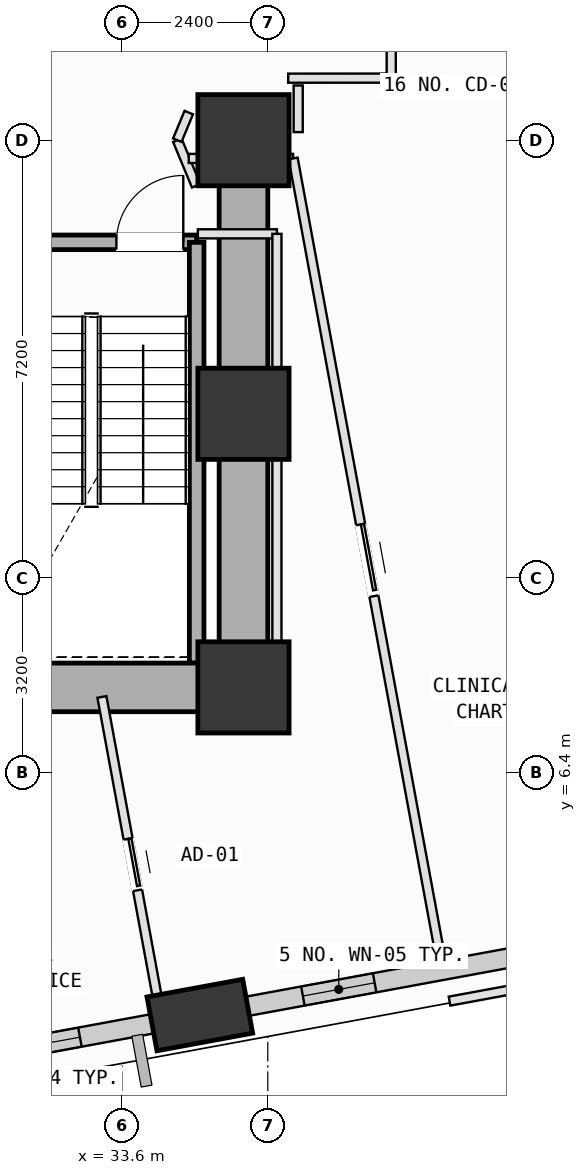
"""IFC4 building model, lengths in metres.
Left out: names, types, materials, properties, quantities, classifications, styles, units other than length and angle.
Written with IfcOpenShell. Run it as: python <this file> out.ifc"""

import sys

from ifc_helpers import new_model, si_unit, direction, frame, frame_2d, origin, origin_2d, place, context, subcontext, project, spatial, rectangle, extrude, element, fill, save


model = new_model("IFC4")
c1 = context("Model", 3, precision=1e-05, world=origin(), true_north=direction((0.0, 1.0)))
c2 = subcontext(c1, "Body", "Model", "MODEL_VIEW")
j1 = project(units=[si_unit("LENGTHUNIT", "METRE"), si_unit("PLANEANGLEUNIT", "RADIAN")], contexts=[c1])
p1 = place(None, origin())
s1 = spatial("IfcSite", under=j1, at=p1, CompositionType="ELEMENT")
p2 = place(p1, origin())
s2 = spatial("IfcBuilding", under=s1, at=p2, CompositionType="ELEMENT")
p3 = place(p2, frame((0.0, 0.0, 67.0)))
s3 = spatial("IfcBuildingStorey", under=s2, at=p3, CompositionType="ELEMENT", Elevation=67.0)
for number, where, z_axis, x_axis in (
    (1, (35.6, 7.8, 0.0), (0.0, 0.0, 1.0), (1.0, 0.0, 0.0)),
    (2, (35.6, 12.3, 0.0), (0.0, 0.0, 1.0), (1.0, 0.0, 0.0)),
    (3, (35.6, 16.8, 0.0), (0.0, 0.0, 1.0), (1.0, 0.0, 0.0)),
):
    element("IfcColumn", number, at=place(p3, frame(where, z_axis=z_axis, x_axis=x_axis)), inside=s3, PredefinedType="COLUMN", context=c2, shape_type="SweptSolid", body=[
        extrude(rectangle(XDim=1.5, YDim=1.5, at=origin_2d()), origin(), (0.0, 0.0, 1.0), 4.0),
    ])
p4 = place(p3, frame((34.882, 2.411, 0.002), z_axis=(0.092332756055, 0.006082526749, 0.995709628872), x_axis=(-0.244852017256, 0.969415188648, 0.016783374669)))
e4 = element("IfcColumn", 4, at=p4, inside=s3, PredefinedType="COLUMN", context=c2, shape_type="SweptSolid", body=[
    extrude(rectangle(XDim=1.6, YDim=0.9, at=origin_2d()), origin(), (0.0, 0.0, 1.0), 4.014),
])
p5 = place(p3, frame((34.466, 2.334, 0.0), z_axis=(0.0, 0.0, 1.0), x_axis=(-0.983412841191, -0.181381321478, 0.0)))
e5 = element("IfcWall", 5, at=p5, inside=s3, PredefinedType="SOLIDWALL", context=c2, shape_type="SweptSolid", body=[
    extrude(rectangle(XDim=5.99, YDim=0.32, at=frame_2d((2.995, 0.0))), origin(), (0.0, 0.0, 1.0), 3.165),
])
p6 = place(p5, frame((1.582, 0.0, 0.75)))
e6 = element("IfcOpeningElement", 6, at=p6, cuts=e5, PredefinedType="OPENING", context=c2, shape_type="SweptSolid", body=[
    extrude(rectangle(XDim=1.8, YDim=2.05, at=frame_2d((0.9, 1.025))), frame((0.0, 0.17, 0.0), z_axis=(0.0, -1.0, 0.0), x_axis=(1.0, 0.0, 0.0)), (0.0, 0.0, 1.0), 0.34),
])
p7 = place(p3, frame((41.547, 3.64, 0.0), z_axis=(0.0, 0.0, 1.0), x_axis=(-0.983417788938, -0.181354493742, 0.0)))
e7 = element("IfcWall", 7, at=p7, inside=s3, PredefinedType="SOLIDWALL", context=c2, shape_type="SweptSolid", body=[
    extrude(rectangle(XDim=5.985, YDim=0.32, at=frame_2d((2.993, 0.0))), origin(), (0.0, 0.0, 1.0), 3.165),
])
p8 = place(p7, frame((3.854, 0.0, 0.75)))
e8 = element("IfcOpeningElement", 8, at=p8, cuts=e7, PredefinedType="OPENING", context=c2, shape_type="SweptSolid", body=[
    extrude(rectangle(XDim=1.2, YDim=1.75, at=frame_2d((0.6, 0.875))), frame((0.0, 0.17, 0.0), z_axis=(0.0, -1.0, 0.0), x_axis=(1.0, 0.0, 0.0)), (0.0, 0.0, 1.0), 0.34),
])
p9 = place(p3, frame((31.37, 15.12, 0.0), z_axis=(0.0, 0.0, 1.0), x_axis=(1.0, 0.0, 0.0)))
e9 = element("IfcWall", 9, at=p9, inside=s3, PredefinedType="SOLIDWALL", context=c2, shape_type="SweptSolid", body=[
    extrude(rectangle(XDim=3.46, YDim=0.24, at=frame_2d((1.73, 0.0))), origin(), (0.0, 0.0, 1.0), 3.78),
])
p10 = place(p9, frame((2.14, 0.0, 0.0)))
e10 = element("IfcOpeningElement", 10, at=p10, cuts=e9, PredefinedType="OPENING", context=c2, shape_type="SweptSolid", body=[
    extrude(rectangle(XDim=1.1, YDim=2.15, at=frame_2d((0.55, 1.075))), frame((0.0, 0.13, 0.0), z_axis=(0.0, -1.0, 0.0), x_axis=(1.0, 0.0, 0.0)), (0.0, 0.0, 1.0), 0.26),
])
p11 = place(p3, frame((34.83, 15.12, 0.0), z_axis=(0.0, 0.0, 1.0), x_axis=(0.0, -1.0, 0.0)))
e11 = element("IfcWall", 11, at=p11, inside=s3, PredefinedType="SOLIDWALL", context=c2, shape_type="SweptSolid", body=[
    extrude(rectangle(XDim=6.92, YDim=0.24, at=frame_2d((3.46, 0.0))), origin(), (0.0, 0.0, 1.0), 3.78),
])
p12 = place(p3, frame((24.8, 7.8, 0.0), z_axis=(0.0, 0.0, 1.0), x_axis=(1.0, 0.0, 0.0)))
e12 = element("IfcWall", 12, at=p12, inside=s3, PredefinedType="SHEAR", context=c2, shape_type="SweptSolid", body=[
    extrude(rectangle(XDim=10.8, YDim=0.8, at=frame_2d((5.4, 0.0))), origin(), (0.0, 0.0, 1.0), 3.78),
])
p13 = place(p3, frame((35.6, 7.8, 0.0), z_axis=(0.0, 0.0, 1.0), x_axis=(0.0, 1.0, 0.0)))
e13 = element("IfcWall", 13, at=p13, inside=s3, PredefinedType="SHEAR", context=c2, shape_type="SweptSolid", body=[
    extrude(rectangle(XDim=9.0, YDim=0.8, at=frame_2d((4.5, 0.0))), origin(), (0.0, 0.0, 1.0), 3.78),
])
p14 = place(p3, frame((33.272, 7.643, 0.0), z_axis=(0.0, 0.0, 1.0), x_axis=(0.181243297431, -0.983438288423, 0.0)))
e14 = element("IfcWall", 14, at=p14, inside=s3, PredefinedType="PARTITIONING", context=c2, shape_type="SweptSolid", body=[
    extrude(rectangle(XDim=5.302, YDim=0.15, at=frame_2d((2.651, 0.0))), origin(), (0.0, 0.0, 1.0), 3.78),
])
p15 = place(p14, frame((2.373, 0.0, 0.0)))
e15 = element("IfcOpeningElement", 15, at=p15, cuts=e14, PredefinedType="OPENING", context=c2, shape_type="SweptSolid", body=[
    extrude(rectangle(XDim=0.86, YDim=2.06, at=frame_2d((0.43, 1.03))), frame((0.0, 0.085, 0.0), z_axis=(0.0, -1.0, 0.0), x_axis=(1.0, 0.0, 0.0)), (0.0, 0.0, 1.0), 0.17),
])
p16 = place(p3, frame((36.15, 15.26, 0.0), z_axis=(0.0, 0.0, 1.0), x_axis=(-1.0, 0.0, 0.0)))
e16 = element("IfcWall", 16, at=p16, inside=s3, PredefinedType="PARTITIONING", context=c2, shape_type="SweptSolid", body=[
    extrude(rectangle(XDim=1.3, YDim=0.15, at=frame_2d((0.65, 0.0))), origin(), (0.0, 0.0, 1.0), 3.78),
])
p17 = place(p3, frame((34.822, 16.05, 0.0), z_axis=(0.0, 0.0, 1.0), x_axis=(-0.382050639738, 0.924141389981, 0.0)))
e17 = element("IfcWall", 17, at=p17, inside=s3, PredefinedType="PARTITIONING", context=c2, shape_type="SweptSolid", body=[
    extrude(rectangle(XDim=0.812, YDim=0.15, at=frame_2d((0.406, 0.0))), origin(), (0.0, 0.0, 1.0), 3.78),
])
p18 = place(p3, frame((34.512, 16.8, 0.0), z_axis=(0.0, 0.0, 1.0), x_axis=(0.382673670509, 0.923883575944, 0.0)))
e18 = element("IfcWall", 18, at=p18, inside=s3, PredefinedType="PARTITIONING", context=c2, shape_type="SweptSolid", body=[
    extrude(rectangle(XDim=0.491, YDim=0.15, at=frame_2d((0.246, 0.0))), origin(), (0.0, 0.0, 1.0), 3.78),
])
p19 = place(p3, frame((34.7, 16.5, 0.0), z_axis=(0.0, 0.0, 1.0), x_axis=(1.0, 0.0, 0.0)))
e19 = element("IfcWall", 19, at=p19, inside=s3, PredefinedType="PARTITIONING", context=c2, shape_type="SweptSolid", body=[
    extrude(rectangle(XDim=1.717, YDim=0.15, at=frame_2d((0.858, 0.0))), origin(), (0.0, 0.0, 1.0), 2.865),
])
p20 = place(p3, frame((36.417, 16.5, 0.0), z_axis=(0.0, 0.0, 1.0), x_axis=(0.181371836751, -0.983414590513, 0.0)))
e20 = element("IfcWall", 20, at=p20, inside=s3, PredefinedType="PARTITIONING", context=c2, shape_type="SweptSolid", body=[
    extrude(rectangle(XDim=13.442, YDim=0.15, at=frame_2d((6.721, 0.0))), origin(), (0.0, 0.0, 1.0), 3.78),
])
p21 = place(p20, frame((6.121, 0.0, 0.0)))
e21 = element("IfcOpeningElement", 21, at=p21, cuts=e20, PredefinedType="OPENING", context=c2, shape_type="SweptSolid", body=[
    extrude(rectangle(XDim=1.2, YDim=2.15, at=frame_2d((0.6, 1.075))), frame((0.0, 0.085, 0.0), z_axis=(0.0, -1.0, 0.0), x_axis=(1.0, 0.0, 0.0)), (0.0, 0.0, 1.0), 0.17),
])
p22 = place(p3, frame((35.703, 2.329, 0.0), z_axis=(0.0, 0.0, 1.0), x_axis=(-0.983292662079, -0.182031702461, 0.0)))
e22 = element("IfcWall", 22, at=p22, inside=s3, PredefinedType="PARTITIONING", context=c2, shape_type="SweptSolid", body=[
    extrude(rectangle(XDim=1.215, YDim=0.15, at=frame_2d((0.607, 0.0))), origin(), (0.0, 0.0, 1.0), 3.165),
])
p23 = place(p3, frame((35.6, 7.5, 0.0), z_axis=(0.0, 0.0, 1.0), x_axis=(1.0, 0.0, 0.0)))
e23 = element("IfcWall", 23, at=p23, inside=s3, PredefinedType="PARTITIONING", context=c2, shape_type="SweptSolid", body=[
    extrude(rectangle(XDim=0.55, YDim=0.15, at=frame_2d((0.275, 0.0))), origin(), (0.0, 0.0, 1.0), 3.78),
])
p24 = place(p3, frame((36.15, 7.5, 0.0), z_axis=(0.0, 0.0, 1.0), x_axis=(0.0, 1.0, 0.0)))
e24 = element("IfcWall", 24, at=p24, inside=s3, PredefinedType="PARTITIONING", context=c2, shape_type="SweptSolid", body=[
    extrude(rectangle(XDim=7.76, YDim=0.15, at=frame_2d((3.88, 0.0))), origin(), (0.0, 0.0, 1.0), 3.78),
])
p25 = place(p3, frame((36.336, 17.82, 0.0), z_axis=(0.0, 0.0, 1.0), x_axis=(0.999999829655, 0.000583685878, 0.0)))
e25 = element("IfcWall", 25, at=p25, inside=s3, PredefinedType="PARTITIONING", context=c2, shape_type="SweptSolid", body=[
    extrude(rectangle(XDim=1.673, YDim=0.15, at=frame_2d((0.836, 0.0))), origin(), (0.0, 0.0, 1.0), 3.78),
])
p26 = place(p3, frame((38.03, 17.85, 0.0), z_axis=(0.0, 0.0, 1.0), x_axis=(0.0, 1.0, 0.0)))
e26 = element("IfcWall", 26, at=p26, inside=s3, PredefinedType="PARTITIONING", context=c2, shape_type="SweptSolid", body=[
    extrude(rectangle(XDim=0.7, YDim=0.15, at=frame_2d((0.35, 0.0))), origin(), (0.0, 0.0, 1.0), 3.78),
])
p27 = place(p3, frame((36.5, 16.933, 0.0), z_axis=(0.0, 0.0, 1.0), x_axis=(0.0, 1.0, 0.0)))
e27 = element("IfcWall", 27, at=p27, inside=s3, PredefinedType="PARTITIONING", context=c2, shape_type="SweptSolid", body=[
    extrude(rectangle(XDim=0.767, YDim=0.15, at=frame_2d((0.383, 0.0))), origin(), (0.0, 0.0, 1.0), 3.78),
])
p28 = place(p3, frame((45.076, 3.763, 0.0), z_axis=(0.0, 0.0, 1.0), x_axis=(-0.983402108303, -0.181439503377, 0.0)))
e28 = element("IfcWall", 28, at=p28, inside=s3, PredefinedType="PARTITIONING", context=c2, shape_type="SweptSolid", body=[
    extrude(rectangle(XDim=6.19, YDim=0.15, at=frame_2d((3.095, 0.0))), origin(), (0.0, 0.0, 1.0), 3.78),
])
p29 = place(p6, origin())
e29 = element("IfcWindow", 29, at=p29, inside=s3, PartitioningType="SINGLE_PANEL", PredefinedType="WINDOW", context=c2, shape_type="SweptSolid", body=[
    extrude(rectangle(XDim=1.8, YDim=2.05, at=frame_2d((0.9, 1.025))), frame((0.0, 0.03, 0.0), z_axis=(0.0, -1.0, 0.0), x_axis=(1.0, 0.0, 0.0)), (0.0, 0.0, 1.0), 0.06),
])
fill(e6, e29)
p30 = place(p8, origin())
e30 = element("IfcWindow", 30, at=p30, inside=s3, PartitioningType="SINGLE_PANEL", PredefinedType="WINDOW", context=c2, shape_type="SweptSolid", body=[
    extrude(rectangle(XDim=1.2, YDim=1.75, at=frame_2d((0.6, 0.875))), frame((0.0, 0.03, 0.0), z_axis=(0.0, -1.0, 0.0), x_axis=(1.0, 0.0, 0.0)), (0.0, 0.0, 1.0), 0.06),
])
fill(e8, e30)
p31 = place(p10, origin())
e31 = element("IfcDoor", 31, at=p31, inside=s3, OperationType="SINGLE_SWING_RIGHT", PredefinedType="DOOR", context=c2, shape_type="SweptSolid", body=[
    extrude(rectangle(XDim=1.1, YDim=2.15, at=frame_2d((0.55, 1.075))), frame((0.0, 0.025, 0.0), z_axis=(0.0, -1.0, 0.0), x_axis=(1.0, 0.0, 0.0)), (0.0, 0.0, 1.0), 0.05),
])
fill(e10, e31)
p32 = place(p21, origin())
e32 = element("IfcDoor", 32, at=p32, inside=s3, OperationType="SLIDING_TO_LEFT", PredefinedType="DOOR", context=c2, shape_type="SweptSolid", body=[
    extrude(rectangle(XDim=1.2, YDim=2.15, at=frame_2d((0.6, 1.075))), frame((0.0, 0.025, 0.0), z_axis=(0.0, -1.0, 0.0), x_axis=(1.0, 0.0, 0.0)), (0.0, 0.0, 1.0), 0.05),
])
fill(e21, e32)
p33 = place(p15, origin())
e33 = element("IfcDoor", 33, at=p33, inside=s3, OperationType="SLIDING_TO_LEFT", PredefinedType="DOOR", context=c2, shape_type="SweptSolid", body=[
    extrude(rectangle(XDim=0.86, YDim=2.06, at=frame_2d((0.43, 1.03))), frame((0.0, 0.025, 0.0), z_axis=(0.0, -1.0, 0.0), x_axis=(1.0, 0.0, 0.0)), (0.0, 0.0, 1.0), 0.05),
])
fill(e15, e33)
save(model, sys.argv[1])
